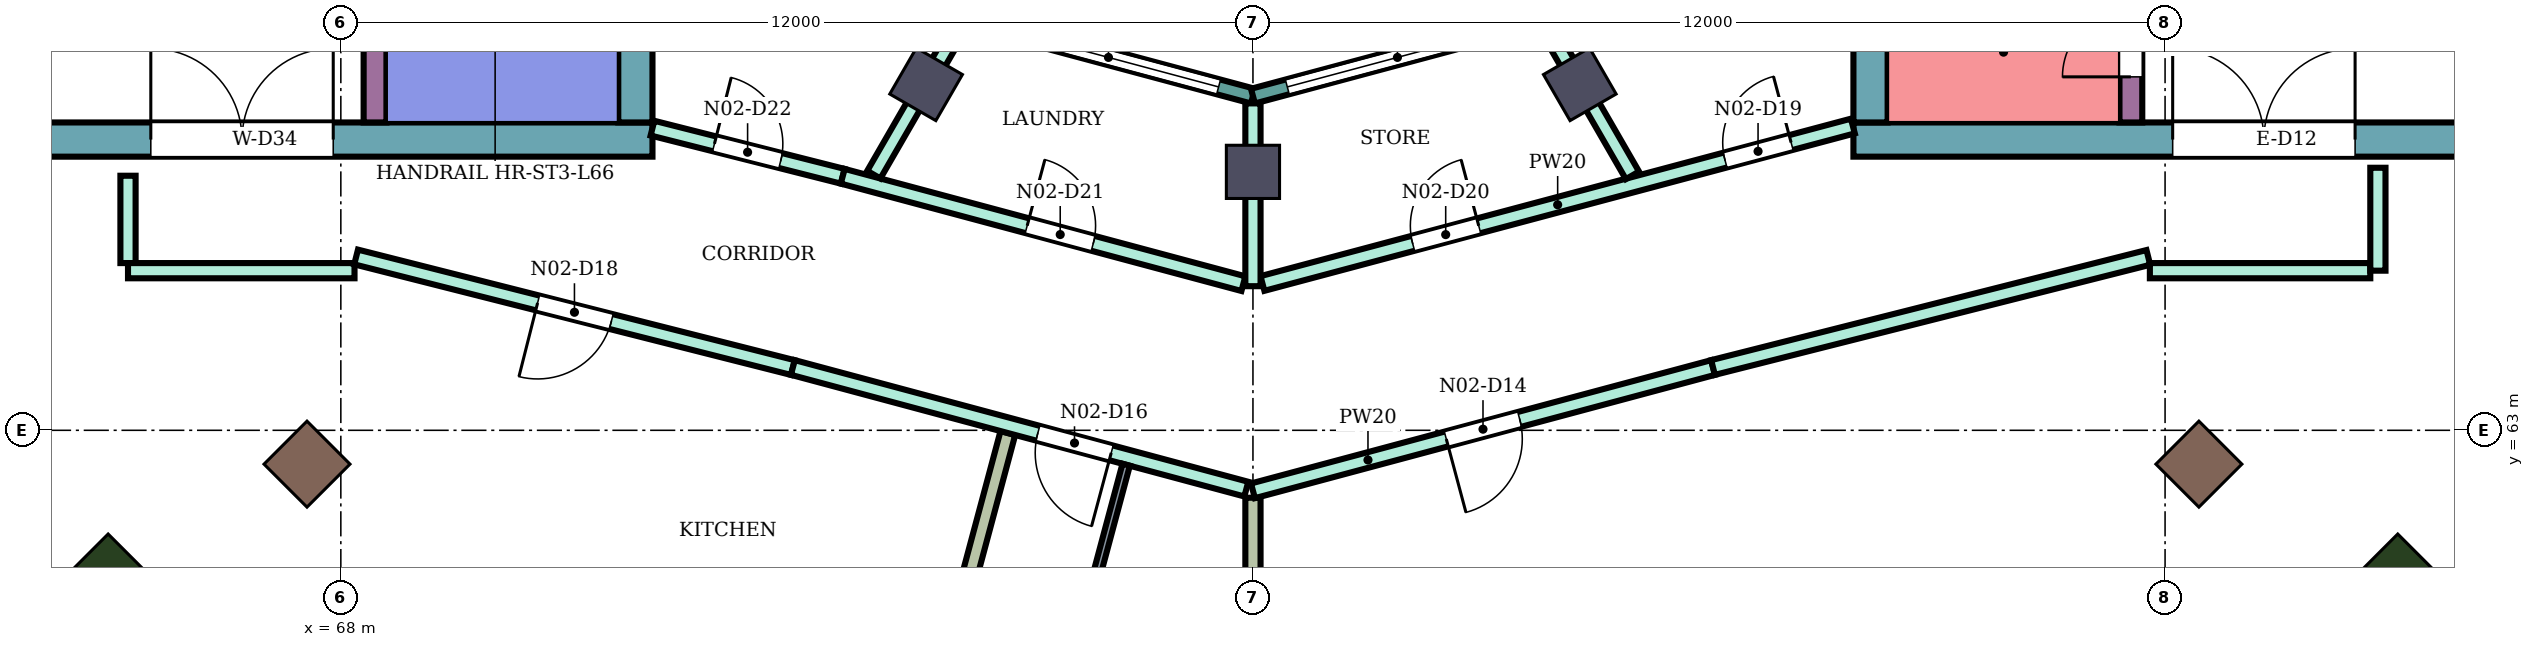
"""IFC4 building model, lengths in metres.
Left out: names, types, materials, properties, quantities, classifications, styles, units other than length and angle.
Written with IfcOpenShell. Run it as: python <this file> out.ifc"""

import sys

from ifc_helpers import new_model, si_unit, direction, frame, frame_2d, origin, origin_2d, place, context, subcontext, project, spatial, rectangle, extrude, element, fill, save


model = new_model("IFC4")
c1 = context("Model", 3, precision=1e-05, world=origin(), true_north=direction((0.0, 1.0)))
c2 = subcontext(c1, "Body", "Model", "MODEL_VIEW")
j1 = project(units=[si_unit("LENGTHUNIT", "METRE"), si_unit("PLANEANGLEUNIT", "RADIAN")], contexts=[c1])
p1 = place(None, origin())
s1 = spatial("IfcSite", under=j1, at=p1, CompositionType="ELEMENT")
p2 = place(p1, origin())
s2 = spatial("IfcBuilding", under=s1, at=p2, CompositionType="ELEMENT")
p3 = place(p2, frame((0.0, 0.0, 288.3)))
s3 = spatial("IfcBuildingStorey", under=s2, at=p3, CompositionType="ELEMENT", Elevation=288.3)
for number, where, z_axis, x_axis in (
    (1, (67.555, 62.555, 0.0), (0.0, 0.0, 1.0), (-0.707, -0.707, 0.0)),
    (2, (92.445, 62.555, 0.0), (0.0, 0.0, 1.0), (0.707, -0.707, 0.0)),
):
    element("IfcColumn", number, at=place(p3, frame(where, z_axis=z_axis, x_axis=x_axis)), inside=s3, PredefinedType="COLUMN", context=c2, shape_type="SweptSolid", body=[
        extrude(rectangle(XDim=0.8, YDim=0.8, at=origin_2d()), origin(), (0.0, 0.0, 1.0), 4.2),
    ])
for number, where, z_axis, x_axis in (
    (3, (75.7, 67.552, 0.0), (0.0, 0.0, 1.0), (-0.5, -0.866, 0.0)),
    (4, (80.0, 66.4, 0.0), (0.0, 0.0, 1.0), (0.0, -1.0, 0.0)),
    (5, (84.3, 67.552, 0.0), (0.0, 0.0, 1.0), (0.5, -0.866, 0.0)),
):
    element("IfcColumn", number, at=place(p3, frame(where, z_axis=z_axis, x_axis=x_axis)), inside=s3, PredefinedType="COLUMN", context=c2, shape_type="SweptSolid", body=[
        extrude(rectangle(XDim=0.7, YDim=0.7, at=origin_2d()), origin(), (0.0, 0.0, 1.0), 4.2),
    ])
for number, where, z_axis, x_axis in (
    (6, (65.151, 60.151, 0.0), (0.0, 0.0, 1.0), (-0.707, -0.707, 0.0)),
    (7, (94.849, 60.151, 0.0), (0.0, 0.0, 1.0), (0.707, -0.707, 0.0)),
):
    element("IfcColumn", number, at=place(p3, frame(where, z_axis=z_axis, x_axis=x_axis)), inside=s3, PredefinedType="COLUMN", context=c2, shape_type="SweptSolid", body=[
        extrude(rectangle(XDim=1.8, YDim=2.4, at=origin_2d()), origin(), (0.0, 0.0, 1.0), 4.2),
    ])
p4 = place(p3, frame((87.9, 66.825, 0.0), z_axis=(0.0, 0.0, 1.0), x_axis=(1.0, 0.0, 0.0)))
e8 = element("IfcWall", 8, at=p4, inside=s3, PredefinedType="SHEAR", context=c2, shape_type="SweptSolid", body=[
    extrude(rectangle(XDim=13.55, YDim=0.45, at=frame_2d((6.775, 0.0))), origin(), (0.0, 0.0, 1.0), 3.88),
])
p5 = place(p4, frame((4.2, 0.0, 0.0)))
e9 = element("IfcOpeningElement", 9, at=p5, cuts=e8, PredefinedType="OPENING", context=c2, shape_type="SweptSolid", body=[
    extrude(rectangle(XDim=2.4, YDim=2.4, at=frame_2d((1.2, 1.2))), frame((0.0, 0.235, 0.0), z_axis=(0.0, -1.0, 0.0), x_axis=(1.0, 0.0, 0.0)), (0.0, 0.0, 1.0), 0.47),
])
p6 = place(p3, frame((88.125, 67.05, 0.0), z_axis=(0.0, 0.0, 1.0), x_axis=(0.0, 1.0, 0.0)))
e10 = element("IfcWall", 10, at=p6, inside=s3, PredefinedType="SHEAR", context=c2, shape_type="SweptSolid", body=[
    extrude(rectangle(XDim=7.95, YDim=0.45, at=frame_2d((3.975, 0.0))), origin(), (0.0, 0.0, 1.0), 3.88),
])
p7 = place(p3, frame((91.55, 67.05, 0.0), z_axis=(0.0, 0.0, 1.0), x_axis=(0.0, 1.0, 0.0)))
e11 = element("IfcWall", 11, at=p7, inside=s3, PredefinedType="SHEAR", context=c2, shape_type="SweptSolid", body=[
    extrude(rectangle(XDim=7.95, YDim=0.3, at=frame_2d((3.975, 0.0))), origin(), (0.0, 0.0, 1.0), 3.88),
])
p8 = place(p7, frame((0.6, 0.0, 0.0)))
e12 = element("IfcOpeningElement", 12, at=p8, cuts=e11, PredefinedType="OPENING", context=c2, shape_type="SweptSolid", body=[
    extrude(rectangle(XDim=0.9, YDim=2.1, at=frame_2d((0.45, 1.05))), frame((0.0, 0.16, 0.0), z_axis=(0.0, -1.0, 0.0), x_axis=(1.0, 0.0, 0.0)), (0.0, 0.0, 1.0), 0.32),
])
p9 = place(p3, frame((72.1, 66.825, 0.0), z_axis=(0.0, 0.0, 1.0), x_axis=(-1.0, 0.0, 0.0)))
e13 = element("IfcWall", 13, at=p9, inside=s3, PredefinedType="SHEAR", context=c2, shape_type="SweptSolid", body=[
    extrude(rectangle(XDim=13.55, YDim=0.45, at=frame_2d((6.775, 0.0))), origin(), (0.0, 0.0, 1.0), 3.88),
])
p10 = place(p9, frame((4.2, 0.0, 0.0)))
e14 = element("IfcOpeningElement", 14, at=p10, cuts=e13, PredefinedType="OPENING", context=c2, shape_type="SweptSolid", body=[
    extrude(rectangle(XDim=2.4, YDim=2.4, at=frame_2d((1.2, 1.2))), frame((0.0, 0.235, 0.0), z_axis=(0.0, -1.0, 0.0), x_axis=(1.0, 0.0, 0.0)), (0.0, 0.0, 1.0), 0.47),
])
p11 = place(p3, frame((71.875, 75.0, 0.0), z_axis=(0.0, 0.0, 1.0), x_axis=(0.0, -1.0, 0.0)))
e15 = element("IfcWall", 15, at=p11, inside=s3, PredefinedType="SHEAR", context=c2, shape_type="SweptSolid", body=[
    extrude(rectangle(XDim=7.95, YDim=0.45, at=frame_2d((3.975, 0.0))), origin(), (0.0, 0.0, 1.0), 3.88),
])
p12 = place(p3, frame((68.45, 75.0, 0.0), z_axis=(0.0, 0.0, 1.0), x_axis=(0.0, -1.0, 0.0)))
e16 = element("IfcWall", 16, at=p12, inside=s3, PredefinedType="SHEAR", context=c2, shape_type="SweptSolid", body=[
    extrude(rectangle(XDim=7.95, YDim=0.3, at=frame_2d((3.975, 0.0))), origin(), (0.0, 0.0, 1.0), 3.88),
])
p13 = place(p12, frame((1.85, 0.0, 0.0)))
e17 = element("IfcOpeningElement", 17, at=p13, cuts=e16, PredefinedType="OPENING", context=c2, shape_type="SweptSolid", body=[
    extrude(rectangle(XDim=0.9, YDim=2.1, at=frame_2d((0.45, 1.05))), frame((0.0, 0.16, 0.0), z_axis=(0.0, -1.0, 0.0), x_axis=(1.0, 0.0, 0.0)), (0.0, 0.0, 1.0), 0.32),
])
p14 = place(p3, frame((76.198, 68.415, 0.0), z_axis=(0.0, 0.0, 1.0), x_axis=(0.965933654434, -0.258789828301, 0.0)))
e18 = element("IfcWall", 18, at=p14, inside=s3, PredefinedType="NOTDEFINED", context=c2, shape_type="SweptSolid", body=[
    extrude(rectangle(XDim=3.936, YDim=0.2, at=frame_2d((1.968, 0.0))), origin(), (0.0, 0.0, 1.0), 4.2),
])
p15 = place(p14, frame((0.468, 0.0, 0.9)))
e19 = element("IfcOpeningElement", 19, at=p15, cuts=e18, PredefinedType="OPENING", context=c2, shape_type="SweptSolid", body=[
    extrude(rectangle(XDim=3.0, YDim=2.3, at=frame_2d((1.5, 1.15))), frame((0.0, 0.11, 0.0), z_axis=(0.0, -1.0, 0.0), x_axis=(1.0, 0.0, 0.0)), (0.0, 0.0, 1.0), 0.22),
])
p16 = place(p3, frame((80.0, 67.396, 0.0), z_axis=(0.0, 0.0, 1.0), x_axis=(0.965933654434, 0.258789828301, 0.0)))
e20 = element("IfcWall", 20, at=p16, inside=s3, PredefinedType="NOTDEFINED", context=c2, shape_type="SweptSolid", body=[
    extrude(rectangle(XDim=3.936, YDim=0.2, at=frame_2d((1.968, 0.0))), origin(), (0.0, 0.0, 1.0), 4.2),
])
p17 = place(p16, frame((0.468, 0.0, 0.9)))
e21 = element("IfcOpeningElement", 21, at=p17, cuts=e20, PredefinedType="OPENING", context=c2, shape_type="SweptSolid", body=[
    extrude(rectangle(XDim=3.0, YDim=2.3, at=frame_2d((1.5, 1.15))), frame((0.0, 0.11, 0.0), z_axis=(0.0, -1.0, 0.0), x_axis=(1.0, 0.0, 0.0)), (0.0, 0.0, 1.0), 0.22),
])
p18 = place(p3, frame((65.2, 65.2, 0.0), z_axis=(0.0, 0.0, 1.0), x_axis=(0.0, 1.0, 0.0)))
e22 = element("IfcWall", 22, at=p18, inside=s3, PredefinedType="PARTITIONING", context=c2, shape_type="SweptSolid", body=[
    extrude(rectangle(XDim=1.149, YDim=0.2, at=frame_2d((0.575, 0.0))), origin(), (0.0, 0.0, 1.0), 3.75),
])
p19 = place(p3, frame((65.2, 65.1, 0.0), z_axis=(0.0, 0.0, 1.0), x_axis=(1.0, 0.0, 0.0)))
e23 = element("IfcWall", 23, at=p19, inside=s3, PredefinedType="PARTITIONING", context=c2, shape_type="SweptSolid", body=[
    extrude(rectangle(XDim=2.98, YDim=0.2, at=frame_2d((1.49, 0.0))), origin(), (0.0, 0.0, 1.0), 3.75),
])
p20 = place(p3, frame((68.201, 65.28, 0.0), z_axis=(0.0, 0.0, 1.0), x_axis=(0.969421088032, -0.245403247897, 0.0)))
e24 = element("IfcWall", 24, at=p20, inside=s3, PredefinedType="PARTITIONING", context=c2, shape_type="SweptSolid", body=[
    extrude(rectangle(XDim=5.927, YDim=0.2, at=frame_2d((2.964, 0.0))), origin(), (0.0, 0.0, 1.0), 3.75),
])
p21 = place(p20, frame((2.463, 0.0, 0.0)))
e25 = element("IfcOpeningElement", 25, at=p21, cuts=e24, PredefinedType="OPENING", context=c2, shape_type="SweptSolid", body=[
    extrude(rectangle(XDim=1.0, YDim=2.1, at=frame_2d((0.5, 1.05))), frame((0.0, 0.11, 0.0), z_axis=(0.0, -1.0, 0.0), x_axis=(1.0, 0.0, 0.0)), (0.0, 0.0, 1.0), 0.22),
])
p22 = place(p3, frame((72.1, 66.975, 0.0), z_axis=(0.0, 0.0, 1.0), x_axis=(0.969471314457, -0.245204752086, 0.0)))
e26 = element("IfcWall", 26, at=p22, inside=s3, PredefinedType="PARTITIONING", context=c2, shape_type="SweptSolid", body=[
    extrude(rectangle(XDim=2.582, YDim=0.2, at=frame_2d((1.291, 0.0))), origin(), (0.0, 0.0, 1.0), 3.75),
])
p23 = place(p22, frame((0.841, 0.0, 0.0)))
e27 = element("IfcOpeningElement", 27, at=p23, cuts=e26, PredefinedType="OPENING", context=c2, shape_type="SweptSolid", body=[
    extrude(rectangle(XDim=0.9, YDim=2.1, at=frame_2d((0.45, 1.05))), frame((0.0, 0.11, 0.0), z_axis=(0.0, -1.0, 0.0), x_axis=(1.0, 0.0, 0.0)), (0.0, 0.0, 1.0), 0.22),
])
p24 = place(p3, frame((73.711, 51.53, 0.0), z_axis=(0.0, 0.0, 1.0), x_axis=(0.258903780219, 0.965903117599, 0.0)))
e28 = element("IfcWall", 28, at=p24, inside=s3, PredefinedType="PARTITIONING", context=c2, shape_type="SweptSolid", body=[
    extrude(rectangle(XDim=11.837, YDim=0.2, at=frame_2d((5.918, 0.0))), origin(), (0.0, 0.0, 1.0), 2.48),
])
p25 = place(p3, frame((73.947, 63.826, 0.0), z_axis=(0.0, 0.0, 1.0), x_axis=(0.965862619462, -0.259054821082, 0.0)))
e29 = element("IfcWall", 29, at=p25, inside=s3, PredefinedType="PARTITIONING", context=c2, shape_type="SweptSolid", body=[
    extrude(rectangle(XDim=6.177, YDim=0.2, at=frame_2d((3.088, 0.0))), origin(), (0.0, 0.0, 1.0), 3.75),
])
p26 = place(p25, frame((3.336, 0.0, 0.0)))
e30 = element("IfcOpeningElement", 30, at=p26, cuts=e29, PredefinedType="OPENING", context=c2, shape_type="SweptSolid", body=[
    extrude(rectangle(XDim=1.0, YDim=2.1, at=frame_2d((0.5, 1.05))), frame((0.0, 0.11, 0.0), z_axis=(0.0, -1.0, 0.0), x_axis=(1.0, 0.0, 0.0)), (0.0, 0.0, 1.0), 0.22),
])
p27 = place(p3, frame((74.603, 66.342, 0.0), z_axis=(0.0, 0.0, 1.0), x_axis=(0.965920893652, -0.258837453254, 0.0)))
e31 = element("IfcWall", 31, at=p27, inside=s3, PredefinedType="PARTITIONING", context=c2, shape_type="SweptSolid", body=[
    extrude(rectangle(XDim=5.458, YDim=0.2, at=frame_2d((2.729, 0.0))), origin(), (0.0, 0.0, 1.0), 3.75),
])
p28 = place(p27, frame((2.512, 0.0, 0.0)))
e32 = element("IfcOpeningElement", 32, at=p28, cuts=e31, PredefinedType="OPENING", context=c2, shape_type="SweptSolid", body=[
    extrude(rectangle(XDim=0.9, YDim=2.1, at=frame_2d((0.45, 1.05))), frame((0.0, 0.11, 0.0), z_axis=(0.0, -1.0, 0.0), x_axis=(1.0, 0.0, 0.0)), (0.0, 0.0, 1.0), 0.22),
])
p29 = place(p3, frame((75.012, 66.363, 0.0), z_axis=(0.0, 0.0, 1.0), x_axis=(0.500143511652, 0.865942531438, 0.0)))
e33 = element("IfcWall", 33, at=p29, inside=s3, PredefinedType="PARTITIONING", context=c2, shape_type="SweptSolid", body=[
    extrude(rectangle(XDim=2.275, YDim=0.2, at=frame_2d((1.138, 0.0))), origin(), (0.0, 0.0, 1.0), 3.75),
])
p30 = place(p3, frame((80.125, 64.932, 0.0), z_axis=(0.0, 0.0, 1.0), x_axis=(0.966236955806, 0.257655089674, 0.0)))
e34 = element("IfcWall", 34, at=p30, inside=s3, PredefinedType="PARTITIONING", context=c2, shape_type="SweptSolid", body=[
    extrude(rectangle(XDim=8.039, YDim=0.2, at=frame_2d((4.02, 0.0))), origin(), (0.0, 0.0, 1.0), 3.75),
])
p31 = place(p30, frame((6.298, 0.0, 0.0)))
e35 = element("IfcOpeningElement", 35, at=p31, cuts=e34, PredefinedType="OPENING", context=c2, shape_type="SweptSolid", body=[
    extrude(rectangle(XDim=0.9, YDim=2.1, at=frame_2d((0.45, 1.05))), frame((0.0, 0.11, 0.0), z_axis=(0.0, -1.0, 0.0), x_axis=(1.0, 0.0, 0.0)), (0.0, 0.0, 1.0), 0.22),
])
p32 = place(p30, frame((2.045, 0.0, 0.0)))
e36 = element("IfcOpeningElement", 36, at=p32, cuts=e34, PredefinedType="OPENING", context=c2, shape_type="SweptSolid", body=[
    extrude(rectangle(XDim=0.9, YDim=2.1, at=frame_2d((0.45, 1.05))), frame((0.0, 0.11, 0.0), z_axis=(0.0, -1.0, 0.0), x_axis=(1.0, 0.0, 0.0)), (0.0, 0.0, 1.0), 0.22),
])
p33 = place(p3, frame((80.0, 53.301, 0.0), z_axis=(0.0, 0.0, 1.0), x_axis=(0.0, 1.0, 0.0)))
e37 = element("IfcWall", 37, at=p33, inside=s3, PredefinedType="PARTITIONING", context=c2, shape_type="SweptSolid", body=[
    extrude(rectangle(XDim=8.812, YDim=0.2, at=frame_2d((4.406, 0.0))), origin(), (0.0, 0.0, 1.0), 2.48),
])
p34 = place(p3, frame((80.0, 62.204, 0.0), z_axis=(0.0, 0.0, 1.0), x_axis=(0.965918660596, 0.258845786351, 0.0)))
e38 = element("IfcWall", 38, at=p34, inside=s3, PredefinedType="PARTITIONING", context=c2, shape_type="SweptSolid", body=[
    extrude(rectangle(XDim=6.267, YDim=0.2, at=frame_2d((3.133, 0.0))), origin(), (0.0, 0.0, 1.0), 3.75),
])
p35 = place(p34, frame((2.633, 0.0, 0.0)))
e39 = element("IfcOpeningElement", 39, at=p35, cuts=e38, PredefinedType="OPENING", context=c2, shape_type="SweptSolid", body=[
    extrude(rectangle(XDim=1.0, YDim=2.1, at=frame_2d((0.5, 1.05))), frame((0.0, 0.11, 0.0), z_axis=(0.0, -1.0, 0.0), x_axis=(1.0, 0.0, 0.0)), (0.0, 0.0, 1.0), 0.22),
])
p36 = place(p3, frame((80.0, 64.896, 0.0), z_axis=(0.0, 0.0, 1.0), x_axis=(0.0, 1.0, 0.0)))
e40 = element("IfcWall", 40, at=p36, inside=s3, PredefinedType="PARTITIONING", context=c2, shape_type="SweptSolid", body=[
    extrude(rectangle(XDim=2.405, YDim=0.2, at=frame_2d((1.203, 0.0))), origin(), (0.0, 0.0, 1.0), 3.75),
])
p37 = place(p3, frame((83.85, 68.333, 0.0), z_axis=(0.0, 0.0, 1.0), x_axis=(0.500080019051, -0.865979199835, 0.0)))
e41 = element("IfcWall", 41, at=p37, inside=s3, PredefinedType="PARTITIONING", context=c2, shape_type="SweptSolid", body=[
    extrude(rectangle(XDim=2.285, YDim=0.2, at=frame_2d((1.143, 0.0))), origin(), (0.0, 0.0, 1.0), 3.75),
])
p38 = place(p3, frame((86.053, 63.826, 0.0), z_axis=(0.0, 0.0, 1.0), x_axis=(0.969480070232, 0.245170131586, 0.0)))
e42 = element("IfcWall", 42, at=p38, inside=s3, PredefinedType="PARTITIONING", context=c2, shape_type="SweptSolid", body=[
    extrude(rectangle(XDim=5.907, YDim=0.2, at=frame_2d((2.954, 0.0))), origin(), (0.0, 0.0, 1.0), 3.75),
])
p39 = place(p3, frame((91.8, 65.1, 0.0), z_axis=(0.0, 0.0, 1.0), x_axis=(1.0, 0.0, 0.0)))
e43 = element("IfcWall", 43, at=p39, inside=s3, PredefinedType="PARTITIONING", context=c2, shape_type="SweptSolid", body=[
    extrude(rectangle(XDim=2.9, YDim=0.2, at=frame_2d((1.45, 0.0))), origin(), (0.0, 0.0, 1.0), 3.75),
])
p40 = place(p3, frame((94.8, 65.1, 0.0), z_axis=(0.0, 0.0, 1.0), x_axis=(0.0, 1.0, 0.0)))
e44 = element("IfcWall", 44, at=p40, inside=s3, PredefinedType="PARTITIONING", context=c2, shape_type="SweptSolid", body=[
    extrude(rectangle(XDim=1.354, YDim=0.2, at=frame_2d((0.677, 0.0))), origin(), (0.0, 0.0, 1.0), 3.75),
])
p41 = place(p3, frame((77.077, 57.862, 0.0), z_axis=(0.0, 0.0, 1.0), x_axis=(0.258774664065, 0.96593771706, 0.0)))
e45 = element("IfcWall", 45, at=p41, inside=s3, PredefinedType="PARTITIONING", context=c2, shape_type="SweptSolid", body=[
    extrude(rectangle(XDim=4.85, YDim=0.1, at=frame_2d((2.425, 0.0))), origin(), (0.0, 0.0, 1.0), 3.75),
])
p42 = place(p41, frame((2.05, 0.0, 0.0)))
e46 = element("IfcOpeningElement", 46, at=p42, cuts=e45, PredefinedType="OPENING", context=c2, shape_type="SweptSolid", body=[
    extrude(rectangle(XDim=0.8, YDim=2.1, at=frame_2d((0.4, 1.05))), frame((0.0, 0.06, 0.0), z_axis=(0.0, -1.0, 0.0), x_axis=(1.0, 0.0, 0.0)), (0.0, 0.0, 1.0), 0.12),
])
p43 = place(p15, origin())
e47 = element("IfcWindow", 47, at=p43, inside=s3, PartitioningType="SINGLE_PANEL", PredefinedType="WINDOW", context=c2, shape_type="SweptSolid", body=[
    extrude(rectangle(XDim=3.0, YDim=2.3, at=frame_2d((1.5, 1.15))), frame((0.0, 0.03, 0.0), z_axis=(0.0, -1.0, 0.0), x_axis=(1.0, 0.0, 0.0)), (0.0, 0.0, 1.0), 0.06),
])
fill(e19, e47)
p44 = place(p17, origin())
e48 = element("IfcWindow", 48, at=p44, inside=s3, PartitioningType="SINGLE_PANEL", PredefinedType="WINDOW", context=c2, shape_type="SweptSolid", body=[
    extrude(rectangle(XDim=3.0, YDim=2.3, at=frame_2d((1.5, 1.15))), frame((0.0, 0.03, 0.0), z_axis=(0.0, -1.0, 0.0), x_axis=(1.0, 0.0, 0.0)), (0.0, 0.0, 1.0), 0.06),
])
fill(e21, e48)
p45 = place(p35, frame((1.0, 0.0, 0.0), z_axis=(0.0, 0.0, 1.0), x_axis=(-1.0, 0.0, 0.0)))
e49 = element("IfcDoor", 49, at=p45, inside=s3, OperationType="SINGLE_SWING_RIGHT", PredefinedType="DOOR", context=c2, shape_type="SweptSolid", body=[
    extrude(rectangle(XDim=1.0, YDim=2.1, at=frame_2d((0.5, 1.05))), frame((0.0, 0.025, 0.0), z_axis=(0.0, -1.0, 0.0), x_axis=(1.0, 0.0, 0.0)), (0.0, 0.0, 1.0), 0.05),
])
fill(e39, e49)
p46 = place(p26, frame((1.0, 0.0, 0.0), z_axis=(0.0, 0.0, 1.0), x_axis=(-1.0, 0.0, 0.0)))
e50 = element("IfcDoor", 50, at=p46, inside=s3, OperationType="SINGLE_SWING_LEFT", PredefinedType="DOOR", context=c2, shape_type="SweptSolid", body=[
    extrude(rectangle(XDim=1.0, YDim=2.1, at=frame_2d((0.5, 1.05))), frame((0.0, 0.025, 0.0), z_axis=(0.0, -1.0, 0.0), x_axis=(1.0, 0.0, 0.0)), (0.0, 0.0, 1.0), 0.05),
])
fill(e30, e50)
p47 = place(p21, frame((1.0, 0.0, 0.0), z_axis=(0.0, 0.0, 1.0), x_axis=(-1.0, 0.0, 0.0)))
e51 = element("IfcDoor", 51, at=p47, inside=s3, OperationType="SINGLE_SWING_RIGHT", PredefinedType="DOOR", context=c2, shape_type="SweptSolid", body=[
    extrude(rectangle(XDim=1.0, YDim=2.1, at=frame_2d((0.5, 1.05))), frame((0.0, 0.025, 0.0), z_axis=(0.0, -1.0, 0.0), x_axis=(1.0, 0.0, 0.0)), (0.0, 0.0, 1.0), 0.05),
])
fill(e25, e51)
p48 = place(p31, origin())
e52 = element("IfcDoor", 52, at=p48, inside=s3, OperationType="SINGLE_SWING_RIGHT", PredefinedType="DOOR", context=c2, shape_type="SweptSolid", body=[
    extrude(rectangle(XDim=0.9, YDim=2.1, at=frame_2d((0.45, 1.05))), frame((0.0, 0.025, 0.0), z_axis=(0.0, -1.0, 0.0), x_axis=(1.0, 0.0, 0.0)), (0.0, 0.0, 1.0), 0.05),
])
fill(e35, e52)
p49 = place(p32, origin())
e53 = element("IfcDoor", 53, at=p49, inside=s3, OperationType="SINGLE_SWING_RIGHT", PredefinedType="DOOR", context=c2, shape_type="SweptSolid", body=[
    extrude(rectangle(XDim=0.9, YDim=2.1, at=frame_2d((0.45, 1.05))), frame((0.0, 0.025, 0.0), z_axis=(0.0, -1.0, 0.0), x_axis=(1.0, 0.0, 0.0)), (0.0, 0.0, 1.0), 0.05),
])
fill(e36, e53)
p50 = place(p28, origin())
e54 = element("IfcDoor", 54, at=p50, inside=s3, OperationType="SINGLE_SWING_LEFT", PredefinedType="DOOR", context=c2, shape_type="SweptSolid", body=[
    extrude(rectangle(XDim=0.9, YDim=2.1, at=frame_2d((0.45, 1.05))), frame((0.0, 0.025, 0.0), z_axis=(0.0, -1.0, 0.0), x_axis=(1.0, 0.0, 0.0)), (0.0, 0.0, 1.0), 0.05),
])
fill(e32, e54)
p51 = place(p23, origin())
e55 = element("IfcDoor", 55, at=p51, inside=s3, OperationType="SINGLE_SWING_LEFT", PredefinedType="DOOR", context=c2, shape_type="SweptSolid", body=[
    extrude(rectangle(XDim=0.9, YDim=2.1, at=frame_2d((0.45, 1.05))), frame((0.0, 0.025, 0.0), z_axis=(0.0, -1.0, 0.0), x_axis=(1.0, 0.0, 0.0)), (0.0, 0.0, 1.0), 0.05),
])
fill(e27, e55)
p52 = place(p8, origin())
e56 = element("IfcDoor", 56, at=p52, inside=s3, OperationType="SINGLE_SWING_LEFT", PredefinedType="DOOR", context=c2, shape_type="SweptSolid", body=[
    extrude(rectangle(XDim=0.9, YDim=2.1, at=frame_2d((0.45, 1.05))), frame((0.0, 0.025, 0.0), z_axis=(0.0, -1.0, 0.0), x_axis=(1.0, 0.0, 0.0)), (0.0, 0.0, 1.0), 0.05),
])
fill(e12, e56)
p53 = place(p5, origin())
e57 = element("IfcDoor", 57, at=p53, inside=s3, OperationType="DOUBLE_DOOR_SINGLE_SWING", PredefinedType="DOOR", context=c2, shape_type="SweptSolid", body=[
    extrude(rectangle(XDim=2.4, YDim=2.4, at=frame_2d((1.2, 1.2))), frame((0.0, 0.025, 0.0), z_axis=(0.0, -1.0, 0.0), x_axis=(1.0, 0.0, 0.0)), (0.0, 0.0, 1.0), 0.05),
])
fill(e9, e57)
p54 = place(p10, frame((2.4, 0.0, 0.0), z_axis=(0.0, 0.0, 1.0), x_axis=(-1.0, 0.0, 0.0)))
e58 = element("IfcDoor", 58, at=p54, inside=s3, OperationType="DOUBLE_DOOR_SINGLE_SWING", PredefinedType="DOOR", context=c2, shape_type="SweptSolid", body=[
    extrude(rectangle(XDim=2.4, YDim=2.4, at=frame_2d((1.2, 1.2))), frame((0.0, 0.025, 0.0), z_axis=(0.0, -1.0, 0.0), x_axis=(1.0, 0.0, 0.0)), (0.0, 0.0, 1.0), 0.05),
])
fill(e14, e58)
save(model, sys.argv[1])
